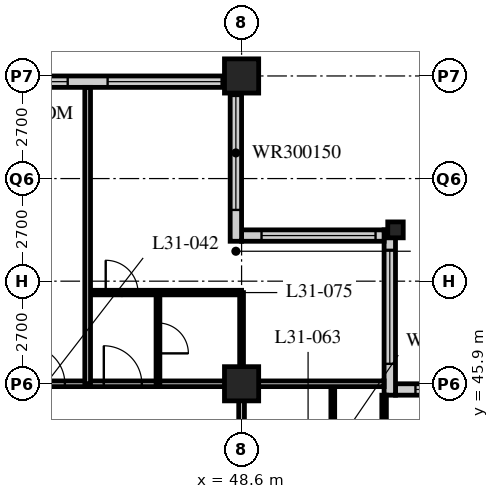
"""IFC4 building model, lengths in metres.
Left out: names, types, materials, properties, quantities, classifications, styles, units other than length and angle.
Written with IfcOpenShell. Run it as: python <this file> out.ifc"""

import sys

from ifc_helpers import new_model, si_unit, direction, frame, frame_2d, origin, origin_2d, place, context, subcontext, project, spatial, rectangle, hollow_rectangle, i_section, extrude, element, fill, save


model = new_model("IFC4")
c1 = context("Model", 3, precision=1e-05, world=origin(), true_north=direction((0.0, 1.0)))
c2 = subcontext(c1, "Body", "Model", "MODEL_VIEW")
j1 = project(units=[si_unit("LENGTHUNIT", "METRE"), si_unit("PLANEANGLEUNIT", "RADIAN")], contexts=[c1])
p1 = place(None, origin())
s1 = spatial("IfcSite", under=j1, at=p1, CompositionType="ELEMENT")
p2 = place(p1, origin())
s2 = spatial("IfcBuilding", under=s1, at=p2, CompositionType="ELEMENT")
p3 = place(p2, frame((0.0, 0.0, 123.8)))
s3 = spatial("IfcBuildingStorey", under=s2, at=p3, CompositionType="ELEMENT", Elevation=123.8)
for number, where, z_axis, x_axis in (
    (1, (48.6, 45.9, 0.0), (0.0, 0.0, 1.0), (1.0, 0.0, 0.0)),
    (2, (48.6, 54.0, 0.0), (0.0, 0.0, 1.0), (1.0, 0.0, 0.0)),
):
    element("IfcColumn", number, at=place(p3, frame(where, z_axis=z_axis, x_axis=x_axis)), inside=s3, PredefinedType="COLUMN", context=c2, shape_type="SweptSolid", body=[
        extrude(hollow_rectangle(XDim=0.9, YDim=0.9, WallThickness=0.09, at=origin_2d()), origin(), (0.0, 0.0, 1.0), 3.4),
    ])
p4 = place(p3, frame((52.65, 49.95, 0.0), z_axis=(0.0, 0.0, 1.0), x_axis=(1.0, 0.0, 0.0)))
e3 = element("IfcColumn", 3, at=p4, inside=s3, PredefinedType="COLUMN", context=c2, shape_type="SweptSolid", body=[
    extrude(i_section(OverallWidth=0.407, OverallDepth=0.419, WebThickness=0.031, FlangeThickness=0.049, FilletRadius=0.015, at=origin_2d()), origin(), (0.0, 0.0, 1.0), 3.4),
])
p5 = place(p3, frame((56.4, 45.75, 0.0), z_axis=(0.0, 0.0, 1.0), x_axis=(-1.0, 0.0, 0.0)))
e4 = element("IfcWall", 4, at=p5, inside=s3, PredefinedType="SOLIDWALL", context=c2, shape_type="SweptSolid", body=[
    extrude(rectangle(XDim=3.75, YDim=0.3, at=frame_2d((1.875, 0.0))), origin(), (0.0, 0.0, 1.0), 3.19),
])
p6 = place(p5, frame((0.225, 0.0, 0.9)))
e5 = element("IfcOpeningElement", 5, at=p6, cuts=e4, PredefinedType="OPENING", context=c2, shape_type="SweptSolid", body=[
    extrude(rectangle(XDim=3.0, YDim=1.5, at=frame_2d((1.5, 0.75))), frame((0.0, 0.16, 0.0), z_axis=(0.0, -1.0, 0.0), x_axis=(1.0, 0.0, 0.0)), (0.0, 0.0, 1.0), 0.32),
])
p7 = place(p3, frame((52.5, 45.6, 0.0), z_axis=(0.0, 0.0, 1.0), x_axis=(0.0, 1.0, 0.0)))
e6 = element("IfcWall", 6, at=p7, inside=s3, PredefinedType="SOLIDWALL", context=c2, shape_type="SweptSolid", body=[
    extrude(rectangle(XDim=4.35, YDim=0.3, at=frame_2d((2.175, 0.0))), origin(), (0.0, 0.0, 1.0), 3.19),
])
p8 = place(p7, frame((0.825, 0.0, 0.9)))
e7 = element("IfcOpeningElement", 7, at=p8, cuts=e6, PredefinedType="OPENING", context=c2, shape_type="SweptSolid", body=[
    extrude(rectangle(XDim=3.0, YDim=1.5, at=frame_2d((1.5, 0.75))), frame((0.0, 0.16, 0.0), z_axis=(0.0, -1.0, 0.0), x_axis=(1.0, 0.0, 0.0)), (0.0, 0.0, 1.0), 0.32),
])
p9 = place(p3, frame((52.35, 49.8, 0.0), z_axis=(0.0, 0.0, 1.0), x_axis=(-1.0, 0.0, 0.0)))
e8 = element("IfcWall", 8, at=p9, inside=s3, PredefinedType="SOLIDWALL", context=c2, shape_type="SweptSolid", body=[
    extrude(rectangle(XDim=3.75, YDim=0.3, at=frame_2d((1.875, 0.0))), origin(), (0.0, 0.0, 1.0), 3.19),
])
p10 = place(p9, frame((0.225, 0.0, 0.9)))
e9 = element("IfcOpeningElement", 9, at=p10, cuts=e8, PredefinedType="OPENING", context=c2, shape_type="SweptSolid", body=[
    extrude(rectangle(XDim=3.0, YDim=1.5, at=frame_2d((1.5, 0.75))), frame((0.0, 0.16, 0.0), z_axis=(0.0, -1.0, 0.0), x_axis=(1.0, 0.0, 0.0)), (0.0, 0.0, 1.0), 0.32),
])
p11 = place(p3, frame((48.45, 49.65, 0.0), z_axis=(0.0, 0.0, 1.0), x_axis=(0.0, 1.0, 0.0)))
e10 = element("IfcWall", 10, at=p11, inside=s3, PredefinedType="SOLIDWALL", context=c2, shape_type="SweptSolid", body=[
    extrude(rectangle(XDim=4.35, YDim=0.3, at=frame_2d((2.175, 0.0))), origin(), (0.0, 0.0, 1.0), 3.19),
])
p12 = place(p11, frame((0.825, 0.0, 0.9)))
e11 = element("IfcOpeningElement", 11, at=p12, cuts=e10, PredefinedType="OPENING", context=c2, shape_type="SweptSolid", body=[
    extrude(rectangle(XDim=3.0, YDim=1.5, at=frame_2d((1.5, 0.75))), frame((0.0, 0.16, 0.0), z_axis=(0.0, -1.0, 0.0), x_axis=(1.0, 0.0, 0.0)), (0.0, 0.0, 1.0), 0.32),
])
p13 = place(p3, frame((48.3, 53.85, 0.0), z_axis=(0.0, 0.0, 1.0), x_axis=(-1.0, 0.0, 0.0)))
e12 = element("IfcWall", 12, at=p13, inside=s3, PredefinedType="SOLIDWALL", context=c2, shape_type="SweptSolid", body=[
    extrude(rectangle(XDim=40.2, YDim=0.3, at=frame_2d((20.1, 0.0))), origin(), (0.0, 0.0, 1.0), 3.19),
])
p14 = place(p13, frame((0.225, 0.0, 0.9)))
e13 = element("IfcOpeningElement", 13, at=p14, cuts=e12, PredefinedType="OPENING", context=c2, shape_type="SweptSolid", body=[
    extrude(rectangle(XDim=3.0, YDim=2.0, at=frame_2d((1.5, 1.0))), frame((0.0, 0.16, 0.0), z_axis=(0.0, -1.0, 0.0), x_axis=(1.0, 0.0, 0.0)), (0.0, 0.0, 1.0), 0.32),
])
p15 = place(p13, frame((4.275, 0.0, 0.9)))
e14 = element("IfcOpeningElement", 14, at=p15, cuts=e12, PredefinedType="OPENING", context=c2, shape_type="SweptSolid", body=[
    extrude(rectangle(XDim=3.0, YDim=2.0, at=frame_2d((1.5, 1.0))), frame((0.0, 0.16, 0.0), z_axis=(0.0, -1.0, 0.0), x_axis=(1.0, 0.0, 0.0)), (0.0, 0.0, 1.0), 0.32),
])
p16 = place(p13, frame((8.325, 0.0, 0.9)))
e15 = element("IfcOpeningElement", 15, at=p16, cuts=e12, PredefinedType="OPENING", context=c2, shape_type="SweptSolid", body=[
    extrude(rectangle(XDim=3.0, YDim=2.0, at=frame_2d((1.5, 1.0))), frame((0.0, 0.16, 0.0), z_axis=(0.0, -1.0, 0.0), x_axis=(1.0, 0.0, 0.0)), (0.0, 0.0, 1.0), 0.32),
])
p17 = place(p13, frame((12.375, 0.0, 0.9)))
e16 = element("IfcOpeningElement", 16, at=p17, cuts=e12, PredefinedType="OPENING", context=c2, shape_type="SweptSolid", body=[
    extrude(rectangle(XDim=3.0, YDim=2.0, at=frame_2d((1.5, 1.0))), frame((0.0, 0.16, 0.0), z_axis=(0.0, -1.0, 0.0), x_axis=(1.0, 0.0, 0.0)), (0.0, 0.0, 1.0), 0.32),
])
p18 = place(p13, frame((16.425, 0.0, 0.9)))
e17 = element("IfcOpeningElement", 17, at=p18, cuts=e12, PredefinedType="OPENING", context=c2, shape_type="SweptSolid", body=[
    extrude(rectangle(XDim=3.0, YDim=2.0, at=frame_2d((1.5, 1.0))), frame((0.0, 0.16, 0.0), z_axis=(0.0, -1.0, 0.0), x_axis=(1.0, 0.0, 0.0)), (0.0, 0.0, 1.0), 0.32),
])
p19 = place(p13, frame((20.475, 0.0, 0.9)))
e18 = element("IfcOpeningElement", 18, at=p19, cuts=e12, PredefinedType="OPENING", context=c2, shape_type="SweptSolid", body=[
    extrude(rectangle(XDim=3.0, YDim=2.0, at=frame_2d((1.5, 1.0))), frame((0.0, 0.16, 0.0), z_axis=(0.0, -1.0, 0.0), x_axis=(1.0, 0.0, 0.0)), (0.0, 0.0, 1.0), 0.32),
])
p20 = place(p13, frame((24.525, 0.0, 0.9)))
e19 = element("IfcOpeningElement", 19, at=p20, cuts=e12, PredefinedType="OPENING", context=c2, shape_type="SweptSolid", body=[
    extrude(rectangle(XDim=3.0, YDim=2.0, at=frame_2d((1.5, 1.0))), frame((0.0, 0.16, 0.0), z_axis=(0.0, -1.0, 0.0), x_axis=(1.0, 0.0, 0.0)), (0.0, 0.0, 1.0), 0.32),
])
p21 = place(p13, frame((28.575, 0.0, 0.9)))
e20 = element("IfcOpeningElement", 20, at=p21, cuts=e12, PredefinedType="OPENING", context=c2, shape_type="SweptSolid", body=[
    extrude(rectangle(XDim=3.0, YDim=2.0, at=frame_2d((1.5, 1.0))), frame((0.0, 0.16, 0.0), z_axis=(0.0, -1.0, 0.0), x_axis=(1.0, 0.0, 0.0)), (0.0, 0.0, 1.0), 0.32),
])
p22 = place(p13, frame((32.625, 0.0, 0.9)))
e21 = element("IfcOpeningElement", 21, at=p22, cuts=e12, PredefinedType="OPENING", context=c2, shape_type="SweptSolid", body=[
    extrude(rectangle(XDim=3.0, YDim=2.0, at=frame_2d((1.5, 1.0))), frame((0.0, 0.16, 0.0), z_axis=(0.0, -1.0, 0.0), x_axis=(1.0, 0.0, 0.0)), (0.0, 0.0, 1.0), 0.32),
])
p23 = place(p13, frame((36.675, 0.0, 0.9)))
e22 = element("IfcOpeningElement", 22, at=p23, cuts=e12, PredefinedType="OPENING", context=c2, shape_type="SweptSolid", body=[
    extrude(rectangle(XDim=3.0, YDim=2.0, at=frame_2d((1.5, 1.0))), frame((0.0, 0.16, 0.0), z_axis=(0.0, -1.0, 0.0), x_axis=(1.0, 0.0, 0.0)), (0.0, 0.0, 1.0), 0.32),
])
p24 = place(p3, frame((8.1, 45.9, 0.0), z_axis=(0.0, 0.0, 1.0), x_axis=(1.0, 0.0, 0.0)))
e23 = element("IfcWall", 23, at=p24, inside=s3, PredefinedType="PARTITIONING", context=c2, shape_type="SweptSolid", body=[
    extrude(rectangle(XDim=40.5, YDim=0.15, at=frame_2d((20.25, 0.0))), origin(), (0.0, 0.0, 1.0), 2.578),
])
p25 = place(p24, frame((9.625, 0.0, 0.0)))
e24 = element("IfcOpeningElement", 24, at=p25, cuts=e23, PredefinedType="OPENING", context=c2, shape_type="SweptSolid", body=[
    extrude(rectangle(XDim=1.0, YDim=2.1, at=frame_2d((0.5, 1.05))), frame((0.0, 0.085, 0.0), z_axis=(0.0, -1.0, 0.0), x_axis=(1.0, 0.0, 0.0)), (0.0, 0.0, 1.0), 0.17),
])
p26 = place(p24, frame((21.65, 0.0, 0.0)))
e25 = element("IfcOpeningElement", 25, at=p26, cuts=e23, PredefinedType="OPENING", context=c2, shape_type="SweptSolid", body=[
    extrude(rectangle(XDim=1.0, YDim=2.1, at=frame_2d((0.5, 1.05))), frame((0.0, 0.085, 0.0), z_axis=(0.0, -1.0, 0.0), x_axis=(1.0, 0.0, 0.0)), (0.0, 0.0, 1.0), 0.17),
])
p27 = place(p24, frame((26.75, 0.0, 0.0)))
e26 = element("IfcOpeningElement", 26, at=p27, cuts=e23, PredefinedType="OPENING", context=c2, shape_type="SweptSolid", body=[
    extrude(rectangle(XDim=1.0, YDim=2.1, at=frame_2d((0.5, 1.05))), frame((0.0, 0.085, 0.0), z_axis=(0.0, -1.0, 0.0), x_axis=(1.0, 0.0, 0.0)), (0.0, 0.0, 1.0), 0.17),
])
p28 = place(p24, frame((28.95, 0.0, 0.0)))
e27 = element("IfcOpeningElement", 27, at=p28, cuts=e23, PredefinedType="OPENING", context=c2, shape_type="SweptSolid", body=[
    extrude(rectangle(XDim=1.0, YDim=2.1, at=frame_2d((0.5, 1.05))), frame((0.0, 0.085, 0.0), z_axis=(0.0, -1.0, 0.0), x_axis=(1.0, 0.0, 0.0)), (0.0, 0.0, 1.0), 0.17),
])
p29 = place(p24, frame((34.85, 0.0, 0.0)))
e28 = element("IfcOpeningElement", 28, at=p29, cuts=e23, PredefinedType="OPENING", context=c2, shape_type="SweptSolid", body=[
    extrude(rectangle(XDim=1.0, YDim=2.1, at=frame_2d((0.5, 1.05))), frame((0.0, 0.085, 0.0), z_axis=(0.0, -1.0, 0.0), x_axis=(1.0, 0.0, 0.0)), (0.0, 0.0, 1.0), 0.17),
])
p30 = place(p24, frame((36.875, 0.0, 0.0)))
e29 = element("IfcOpeningElement", 29, at=p30, cuts=e23, PredefinedType="OPENING", context=c2, shape_type="SweptSolid", body=[
    extrude(rectangle(XDim=1.0, YDim=2.1, at=frame_2d((0.5, 1.05))), frame((0.0, 0.085, 0.0), z_axis=(0.0, -1.0, 0.0), x_axis=(1.0, 0.0, 0.0)), (0.0, 0.0, 1.0), 0.17),
])
p31 = place(p24, frame((2.625, 0.0, 0.0)))
e30 = element("IfcOpeningElement", 30, at=p31, cuts=e23, PredefinedType="OPENING", context=c2, shape_type="SweptSolid", body=[
    extrude(rectangle(XDim=1.0, YDim=2.1, at=frame_2d((0.5, 1.05))), frame((0.0, 0.085, 0.0), z_axis=(0.0, -1.0, 0.0), x_axis=(1.0, 0.0, 0.0)), (0.0, 0.0, 1.0), 0.17),
])
p32 = place(p3, frame((48.6, 21.6, 0.0), z_axis=(0.0, 0.0, 1.0), x_axis=(0.0, 1.0, 0.0)))
e31 = element("IfcWall", 31, at=p32, inside=s3, PredefinedType="PARTITIONING", context=c2, shape_type="SweptSolid", body=[
    extrude(rectangle(XDim=24.3, YDim=0.15, at=frame_2d((12.15, 0.0))), origin(), (0.0, 0.0, 1.0), 2.578),
])
p33 = place(p32, frame((2.75, 0.0, 0.0)))
e32 = element("IfcOpeningElement", 32, at=p33, cuts=e31, PredefinedType="OPENING", context=c2, shape_type="SweptSolid", body=[
    extrude(rectangle(XDim=1.0, YDim=2.1, at=frame_2d((0.5, 1.05))), frame((0.0, 0.085, 0.0), z_axis=(0.0, -1.0, 0.0), x_axis=(1.0, 0.0, 0.0)), (0.0, 0.0, 1.0), 0.17),
])
p34 = place(p32, frame((4.65, 0.0, 0.0)))
e33 = element("IfcOpeningElement", 33, at=p34, cuts=e31, PredefinedType="OPENING", context=c2, shape_type="SweptSolid", body=[
    extrude(rectangle(XDim=1.0, YDim=2.1, at=frame_2d((0.5, 1.05))), frame((0.0, 0.085, 0.0), z_axis=(0.0, -1.0, 0.0), x_axis=(1.0, 0.0, 0.0)), (0.0, 0.0, 1.0), 0.17),
])
p35 = place(p32, frame((10.0, 0.0, 0.0)))
e34 = element("IfcOpeningElement", 34, at=p35, cuts=e31, PredefinedType="OPENING", context=c2, shape_type="SweptSolid", body=[
    extrude(rectangle(XDim=1.0, YDim=2.1, at=frame_2d((0.5, 1.05))), frame((0.0, 0.085, 0.0), z_axis=(0.0, -1.0, 0.0), x_axis=(1.0, 0.0, 0.0)), (0.0, 0.0, 1.0), 0.17),
])
p36 = place(p32, frame((18.1, 0.0, 0.0)))
e35 = element("IfcOpeningElement", 35, at=p36, cuts=e31, PredefinedType="OPENING", context=c2, shape_type="SweptSolid", body=[
    extrude(rectangle(XDim=1.0, YDim=2.1, at=frame_2d((0.5, 1.05))), frame((0.0, 0.085, 0.0), z_axis=(0.0, -1.0, 0.0), x_axis=(1.0, 0.0, 0.0)), (0.0, 0.0, 1.0), 0.17),
])
p37 = place(p3, frame((51.0, 43.3, 0.0), z_axis=(0.0, 0.0, 1.0), x_axis=(0.0, 1.0, 0.0)))
e36 = element("IfcWall", 36, at=p37, inside=s3, PredefinedType="PARTITIONING", context=c2, shape_type="SweptSolid", body=[
    extrude(rectangle(XDim=2.6, YDim=0.1, at=frame_2d((1.3, 0.0))), origin(), (0.0, 0.0, 1.0), 3.19),
])
p38 = place(p3, frame((44.55, 48.3, 0.0), z_axis=(0.0, 0.0, 1.0), x_axis=(1.0, 0.0, 0.0)))
e37 = element("IfcWall", 37, at=p38, inside=s3, PredefinedType="PARTITIONING", context=c2, shape_type="SweptSolid", body=[
    extrude(rectangle(XDim=4.05, YDim=0.12, at=frame_2d((2.025, 0.0))), origin(), (0.0, 0.0, 1.0), 3.19),
])
p39 = place(p38, frame((0.475, 0.0, 0.0)))
e38 = element("IfcOpeningElement", 38, at=p39, cuts=e37, PredefinedType="OPENING", context=c2, shape_type="SweptSolid", body=[
    extrude(rectangle(XDim=0.85, YDim=2.1, at=frame_2d((0.425, 1.05))), frame((0.0, 0.07, 0.0), z_axis=(0.0, -1.0, 0.0), x_axis=(1.0, 0.0, 0.0)), (0.0, 0.0, 1.0), 0.14),
])
p40 = place(p3, frame((46.4, 45.9, 0.0), z_axis=(0.0, 0.0, 1.0), x_axis=(0.0, 1.0, 0.0)))
e39 = element("IfcWall", 39, at=p40, inside=s3, PredefinedType="PARTITIONING", context=c2, shape_type="SweptSolid", body=[
    extrude(rectangle(XDim=2.4, YDim=0.1, at=frame_2d((1.2, 0.0))), origin(), (0.0, 0.0, 1.0), 3.19),
])
p41 = place(p40, frame((0.8, 0.0, 0.0)))
e40 = element("IfcOpeningElement", 40, at=p41, cuts=e39, PredefinedType="OPENING", context=c2, shape_type="SweptSolid", body=[
    extrude(rectangle(XDim=0.8, YDim=2.1, at=frame_2d((0.4, 1.05))), frame((0.0, 0.06, 0.0), z_axis=(0.0, -1.0, 0.0), x_axis=(1.0, 0.0, 0.0)), (0.0, 0.0, 1.0), 0.12),
])
p42 = place(p3, frame((48.6, 45.9, 0.0), z_axis=(0.0, 0.0, 1.0), x_axis=(0.0, 1.0, 0.0)))
e41 = element("IfcWall", 41, at=p42, inside=s3, PredefinedType="PARTITIONING", context=c2, shape_type="SweptSolid", body=[
    extrude(rectangle(XDim=2.4, YDim=0.1, at=frame_2d((1.2, 0.0))), origin(), (0.0, 0.0, 1.0), 2.578),
])
p43 = place(p3, frame((48.6, 45.9, 0.0), z_axis=(0.0, 0.0, 1.0), x_axis=(1.0, 0.0, 0.0)))
e42 = element("IfcWall", 42, at=p43, inside=s3, PredefinedType="PARTITIONING", context=c2, shape_type="SweptSolid", body=[
    extrude(rectangle(XDim=3.75, YDim=0.15, at=frame_2d((1.875, 0.0))), origin(), (0.0, 0.0, 1.0), 2.578),
])
p44 = place(p3, frame((44.55, 45.9, 0.0), z_axis=(0.0, 0.0, 1.0), x_axis=(0.0, 1.0, 0.0)))
e43 = element("IfcWall", 43, at=p44, inside=s3, PredefinedType="PARTITIONING", context=c2, shape_type="SweptSolid", body=[
    extrude(rectangle(XDim=7.8, YDim=0.15, at=frame_2d((3.9, 0.0))), origin(), (0.0, 0.0, 1.0), 3.19),
])
p45 = place(p3, frame((52.35, 45.6, 0.0), z_axis=(0.0, 0.0, 1.0), x_axis=(0.0, -1.0, 0.0)))
e44 = element("IfcWall", 44, at=p45, inside=s3, PredefinedType="PARTITIONING", context=c2, shape_type="SweptSolid", body=[
    extrude(rectangle(XDim=3.75, YDim=0.12, at=frame_2d((1.875, 0.0))), origin(), (0.0, 0.0, 1.0), 3.19),
])
p46 = place(p45, frame((2.625, 0.0, 0.0)))
e45 = element("IfcOpeningElement", 45, at=p46, cuts=e44, PredefinedType="OPENING", context=c2, shape_type="SweptSolid", body=[
    extrude(rectangle(XDim=0.85, YDim=2.1, at=frame_2d((0.425, 1.05))), frame((0.0, 0.07, 0.0), z_axis=(0.0, -1.0, 0.0), x_axis=(1.0, 0.0, 0.0)), (0.0, 0.0, 1.0), 0.14),
])
p47 = place(p6, origin())
e46 = element("IfcWindow", 46, at=p47, inside=s3, PartitioningType="SINGLE_PANEL", PredefinedType="WINDOW", context=c2, shape_type="SweptSolid", body=[
    extrude(rectangle(XDim=3.0, YDim=1.5, at=frame_2d((1.5, 0.75))), frame((0.0, 0.03, 0.0), z_axis=(0.0, -1.0, 0.0), x_axis=(1.0, 0.0, 0.0)), (0.0, 0.0, 1.0), 0.06),
])
fill(e5, e46)
p48 = place(p8, origin())
e47 = element("IfcWindow", 47, at=p48, inside=s3, PartitioningType="SINGLE_PANEL", PredefinedType="WINDOW", context=c2, shape_type="SweptSolid", body=[
    extrude(rectangle(XDim=3.0, YDim=1.5, at=frame_2d((1.5, 0.75))), frame((0.0, 0.03, 0.0), z_axis=(0.0, -1.0, 0.0), x_axis=(1.0, 0.0, 0.0)), (0.0, 0.0, 1.0), 0.06),
])
fill(e7, e47)
p49 = place(p10, origin())
e48 = element("IfcWindow", 48, at=p49, inside=s3, PartitioningType="SINGLE_PANEL", PredefinedType="WINDOW", context=c2, shape_type="SweptSolid", body=[
    extrude(rectangle(XDim=3.0, YDim=1.5, at=frame_2d((1.5, 0.75))), frame((0.0, 0.03, 0.0), z_axis=(0.0, -1.0, 0.0), x_axis=(1.0, 0.0, 0.0)), (0.0, 0.0, 1.0), 0.06),
])
fill(e9, e48)
p50 = place(p12, origin())
e49 = element("IfcWindow", 49, at=p50, inside=s3, PartitioningType="SINGLE_PANEL", PredefinedType="WINDOW", context=c2, shape_type="SweptSolid", body=[
    extrude(rectangle(XDim=3.0, YDim=1.5, at=frame_2d((1.5, 0.75))), frame((0.0, 0.03, 0.0), z_axis=(0.0, -1.0, 0.0), x_axis=(1.0, 0.0, 0.0)), (0.0, 0.0, 1.0), 0.06),
])
fill(e11, e49)
p51 = place(p14, origin())
e50 = element("IfcWindow", 50, at=p51, inside=s3, PartitioningType="SINGLE_PANEL", PredefinedType="WINDOW", context=c2, shape_type="SweptSolid", body=[
    extrude(rectangle(XDim=3.0, YDim=2.0, at=frame_2d((1.5, 1.0))), frame((0.0, 0.03, 0.0), z_axis=(0.0, -1.0, 0.0), x_axis=(1.0, 0.0, 0.0)), (0.0, 0.0, 1.0), 0.06),
])
fill(e13, e50)
p52 = place(p15, origin())
e51 = element("IfcWindow", 51, at=p52, inside=s3, PartitioningType="SINGLE_PANEL", PredefinedType="WINDOW", context=c2, shape_type="SweptSolid", body=[
    extrude(rectangle(XDim=3.0, YDim=2.0, at=frame_2d((1.5, 1.0))), frame((0.0, 0.03, 0.0), z_axis=(0.0, -1.0, 0.0), x_axis=(1.0, 0.0, 0.0)), (0.0, 0.0, 1.0), 0.06),
])
fill(e14, e51)
p53 = place(p29, origin())
e52 = element("IfcDoor", 52, at=p53, inside=s3, OperationType="SINGLE_SWING_LEFT", PredefinedType="DOOR", context=c2, shape_type="SweptSolid", body=[
    extrude(rectangle(XDim=1.0, YDim=2.1, at=frame_2d((0.5, 1.05))), frame((0.0, 0.025, 0.0), z_axis=(0.0, -1.0, 0.0), x_axis=(1.0, 0.0, 0.0)), (0.0, 0.0, 1.0), 0.05),
])
fill(e28, e52)
p54 = place(p41, origin())
e53 = element("IfcDoor", 53, at=p54, inside=s3, OperationType="SINGLE_SWING_RIGHT", PredefinedType="DOOR", context=c2, shape_type="SweptSolid", body=[
    extrude(rectangle(XDim=0.8, YDim=2.1, at=frame_2d((0.4, 1.05))), frame((0.0, 0.025, 0.0), z_axis=(0.0, -1.0, 0.0), x_axis=(1.0, 0.0, 0.0)), (0.0, 0.0, 1.0), 0.05),
])
fill(e40, e53)
p55 = place(p30, origin())
e54 = element("IfcDoor", 54, at=p55, inside=s3, OperationType="SINGLE_SWING_LEFT", PredefinedType="DOOR", context=c2, shape_type="SweptSolid", body=[
    extrude(rectangle(XDim=1.0, YDim=2.1, at=frame_2d((0.5, 1.05))), frame((0.0, 0.025, 0.0), z_axis=(0.0, -1.0, 0.0), x_axis=(1.0, 0.0, 0.0)), (0.0, 0.0, 1.0), 0.05),
])
fill(e29, e54)
p56 = place(p39, origin())
e55 = element("IfcDoor", 55, at=p56, inside=s3, OperationType="SINGLE_SWING_LEFT", PredefinedType="DOOR", context=c2, shape_type="SweptSolid", body=[
    extrude(rectangle(XDim=0.85, YDim=2.1, at=frame_2d((0.425, 1.05))), frame((0.0, 0.025, 0.0), z_axis=(0.0, -1.0, 0.0), x_axis=(1.0, 0.0, 0.0)), (0.0, 0.0, 1.0), 0.05),
])
fill(e38, e55)
save(model, sys.argv[1])
